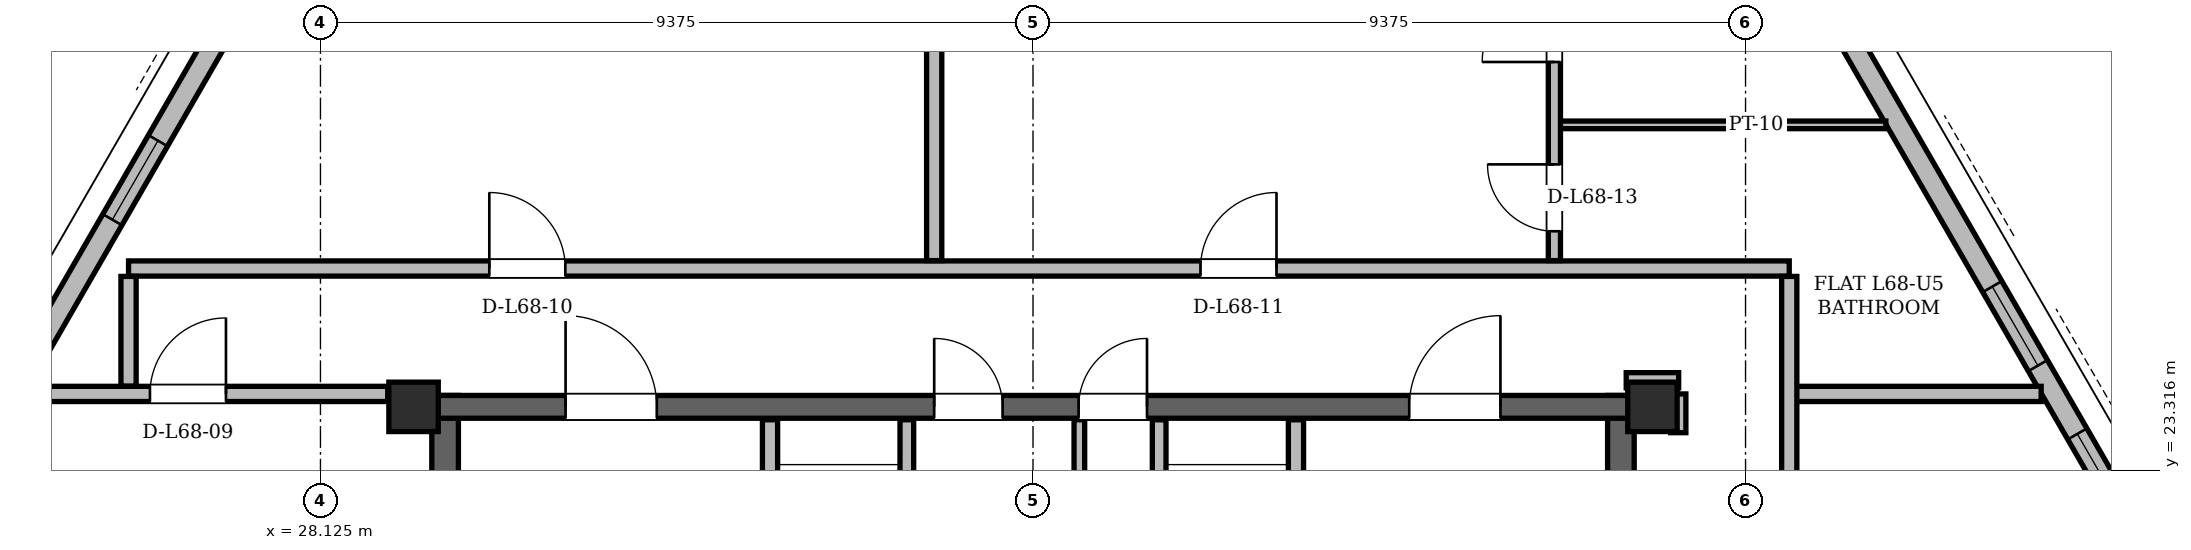
"""IFC4 building model, lengths in metres.
Left out: names, types, materials, properties, quantities, classifications, styles, units other than length and angle.
Written with IfcOpenShell. Run it as: python <this file> out.ifc"""

import sys

from ifc_helpers import new_model, si_unit, direction, frame, frame_2d, origin, origin_2d, place, context, subcontext, project, spatial, rectangle, hollow_rectangle, extrude, element, fill, save


model = new_model("IFC4")
c1 = context("Model", 3, precision=1e-05, world=origin(), true_north=direction((0.0, 1.0)))
c2 = subcontext(c1, "Body", "Model", "MODEL_VIEW")
j1 = project(units=[si_unit("LENGTHUNIT", "METRE"), si_unit("PLANEANGLEUNIT", "RADIAN")], contexts=[c1])
p1 = place(None, origin())
s1 = spatial("IfcSite", under=j1, at=p1, CompositionType="ELEMENT")
p2 = place(p1, origin())
s2 = spatial("IfcBuilding", under=s1, at=p2, CompositionType="ELEMENT")
p3 = place(p2, frame((0.0, 0.0, 257.7)))
s3 = spatial("IfcBuildingStorey", under=s2, at=p3, CompositionType="ELEMENT", Elevation=257.7)
for number, where, z_axis, x_axis in (
    (1, (45.65, 24.15, 0.0), (0.0, 0.0, 1.0), (1.0, 0.0, 0.0)),
    (2, (29.35, 24.15, 0.0), (0.0, 0.0, 1.0), (1.0, 0.0, 0.0)),
):
    element("IfcColumn", number, at=place(p3, frame(where, z_axis=z_axis, x_axis=x_axis)), inside=s3, PredefinedType="COLUMN", context=c2, shape_type="SweptSolid", body=[
        extrude(hollow_rectangle(XDim=0.65, YDim=0.65, WallThickness=0.05, at=origin_2d()), origin(), (0.0, 0.0, 1.0), 3.9),
    ])
for number, where, z_axis, x_axis in (
    (3, (29.765, 11.0, 0.0), (0.0, 0.0, 1.0), (0.0, 1.0, 0.0)),
    (4, (45.235, 11.0, 0.0), (0.0, 0.0, 1.0), (0.0, 1.0, 0.0)),
):
    element("IfcWall", number, at=place(p3, frame(where, z_axis=z_axis, x_axis=x_axis)), inside=s3, PredefinedType="SHEAR", context=c2, shape_type="SweptSolid", body=[
        extrude(rectangle(XDim=13.3, YDim=0.35, at=frame_2d((6.65, 0.0))), origin(), (0.0, 0.0, 1.0), 3.68),
    ])
p4 = place(p3, frame((29.65, 24.15, 0.0), z_axis=(0.0, 0.0, 1.0), x_axis=(1.0, 0.0, 0.0)))
e5 = element("IfcWall", 5, at=p4, inside=s3, PredefinedType="SHEAR", context=c2, shape_type="SweptSolid", body=[
    extrude(rectangle(XDim=15.7, YDim=0.3, at=frame_2d((7.85, 0.0))), origin(), (0.0, 0.0, 1.0), 3.68),
])
p5 = place(p4, frame((1.7, 0.0, 0.0)))
e6 = element("IfcOpeningElement", 6, at=p5, cuts=e5, PredefinedType="OPENING", context=c2, shape_type="SweptSolid", body=[
    extrude(rectangle(XDim=1.2, YDim=2.2, at=frame_2d((0.6, 1.1))), frame((0.0, 0.15, 0.0), z_axis=(0.0, -1.0, 0.0), x_axis=(1.0, 0.0, 0.0)), (0.0, 0.0, 1.0), 0.3),
])
p6 = place(p4, frame((12.8, 0.0, 0.0)))
e7 = element("IfcOpeningElement", 7, at=p6, cuts=e5, PredefinedType="OPENING", context=c2, shape_type="SweptSolid", body=[
    extrude(rectangle(XDim=1.2, YDim=2.2, at=frame_2d((0.6, 1.1))), frame((0.0, 0.15, 0.0), z_axis=(0.0, -1.0, 0.0), x_axis=(1.0, 0.0, 0.0)), (0.0, 0.0, 1.0), 0.3),
])
p7 = place(p4, frame((6.55, 0.0, 0.0)))
e8 = element("IfcOpeningElement", 8, at=p7, cuts=e5, PredefinedType="OPENING", context=c2, shape_type="SweptSolid", body=[
    extrude(rectangle(XDim=0.9, YDim=2.05, at=frame_2d((0.45, 1.025))), frame((0.0, 0.15, 0.0), z_axis=(0.0, -1.0, 0.0), x_axis=(1.0, 0.0, 0.0)), (0.0, 0.0, 1.0), 0.3),
])
p8 = place(p4, frame((8.45, 0.0, 0.0)))
e9 = element("IfcOpeningElement", 9, at=p8, cuts=e5, PredefinedType="OPENING", context=c2, shape_type="SweptSolid", body=[
    extrude(rectangle(XDim=0.9, YDim=2.05, at=frame_2d((0.45, 1.025))), frame((0.0, 0.15, 0.0), z_axis=(0.0, -1.0, 0.0), x_axis=(1.0, 0.0, 0.0)), (0.0, 0.0, 1.0), 0.3),
])
p9 = place(p3, frame((58.693, 10.886, 0.0), z_axis=(0.0, 0.0, 1.0), x_axis=(-0.500001564453, 0.866024500545, 0.0)))
e10 = element("IfcWall", 10, at=p9, inside=s3, PredefinedType="SOLIDWALL", context=c2, shape_type="SweptSolid", body=[
    extrude(rectangle(XDim=37.152, YDim=0.29, at=frame_2d((18.576, 0.0))), origin(), (0.0, 0.0, 1.0), 3.058),
])
p10 = place(p9, frame((6.789, 0.0, 0.0)))
e11 = element("IfcOpeningElement", 11, at=p10, cuts=e10, PredefinedType="OPENING", context=c2, shape_type="SweptSolid", body=[
    extrude(rectangle(XDim=1.5, YDim=2.2, at=frame_2d((0.75, 1.1))), frame((0.0, 0.145, 0.0), z_axis=(0.0, -1.0, 0.0), x_axis=(1.0, 0.0, 0.0)), (0.0, 0.0, 1.0), 0.29),
])
p11 = place(p9, frame((28.247, 0.0, 0.0)))
e12 = element("IfcOpeningElement", 12, at=p11, cuts=e10, PredefinedType="OPENING", context=c2, shape_type="SweptSolid", body=[
    extrude(rectangle(XDim=1.5, YDim=2.2, at=frame_2d((0.75, 1.1))), frame((0.0, 0.145, 0.0), z_axis=(0.0, -1.0, 0.0), x_axis=(1.0, 0.0, 0.0)), (0.0, 0.0, 1.0), 0.29),
])
p12 = place(p9, frame((12.305, 0.0, 0.85)))
e13 = element("IfcOpeningElement", 13, at=p12, cuts=e10, PredefinedType="OPENING", context=c2, shape_type="SweptSolid", body=[
    extrude(rectangle(XDim=2.6, YDim=1.95, at=frame_2d((1.3, 0.975))), frame((0.0, 0.145, 0.0), z_axis=(0.0, -1.0, 0.0), x_axis=(1.0, 0.0, 0.0)), (0.0, 0.0, 1.0), 0.29),
])
p13 = place(p9, frame((1.096, 0.0, 0.85)))
e14 = element("IfcOpeningElement", 14, at=p13, cuts=e10, PredefinedType="OPENING", context=c2, shape_type="SweptSolid", body=[
    extrude(rectangle(XDim=2.4, YDim=1.9, at=frame_2d((1.2, 0.95))), frame((0.0, 0.145, 0.0), z_axis=(0.0, -1.0, 0.0), x_axis=(1.0, 0.0, 0.0)), (0.0, 0.0, 1.0), 0.29),
])
p14 = place(p9, frame((33.401, 0.0, 0.85)))
e15 = element("IfcOpeningElement", 15, at=p14, cuts=e10, PredefinedType="OPENING", context=c2, shape_type="SweptSolid", body=[
    extrude(rectangle(XDim=1.2, YDim=1.48, at=frame_2d((0.6, 0.74))), frame((0.0, 0.145, 0.0), z_axis=(0.0, -1.0, 0.0), x_axis=(1.0, 0.0, 0.0)), (0.0, 0.0, 1.0), 0.29),
])
p15 = place(p9, frame((15.942, 0.0, 0.85)))
e16 = element("IfcOpeningElement", 16, at=p15, cuts=e10, PredefinedType="OPENING", context=c2, shape_type="SweptSolid", body=[
    extrude(rectangle(XDim=1.2, YDim=1.48, at=frame_2d((0.6, 0.74))), frame((0.0, 0.145, 0.0), z_axis=(0.0, -1.0, 0.0), x_axis=(1.0, 0.0, 0.0)), (0.0, 0.0, 1.0), 0.29),
])
p16 = place(p9, frame((23.43, 0.0, 0.85)))
e17 = element("IfcOpeningElement", 17, at=p16, cuts=e10, PredefinedType="OPENING", context=c2, shape_type="SweptSolid", body=[
    extrude(rectangle(XDim=1.2, YDim=1.48, at=frame_2d((0.6, 0.74))), frame((0.0, 0.145, 0.0), z_axis=(0.0, -1.0, 0.0), x_axis=(1.0, 0.0, 0.0)), (0.0, 0.0, 1.0), 0.29),
])
p17 = place(p3, frame((34.883, 43.06, 0.0), z_axis=(0.0, 0.0, 1.0), x_axis=(-0.500001564453, -0.866024500545, 0.0)))
e18 = element("IfcWall", 18, at=p17, inside=s3, PredefinedType="SOLIDWALL", context=c2, shape_type="SweptSolid", body=[
    extrude(rectangle(XDim=37.152, YDim=0.29, at=frame_2d((18.576, 0.0))), origin(), (0.0, 0.0, 1.0), 3.058),
])
p18 = place(p17, frame((3.639, 0.0, 0.0)))
e19 = element("IfcOpeningElement", 19, at=p18, cuts=e18, PredefinedType="OPENING", context=c2, shape_type="SweptSolid", body=[
    extrude(rectangle(XDim=1.5, YDim=2.2, at=frame_2d((0.75, 1.1))), frame((0.0, 0.145, 0.0), z_axis=(0.0, -1.0, 0.0), x_axis=(1.0, 0.0, 0.0)), (0.0, 0.0, 1.0), 0.29),
])
p19 = place(p17, frame((27.617, 0.0, 0.0)))
e20 = element("IfcOpeningElement", 20, at=p19, cuts=e18, PredefinedType="OPENING", context=c2, shape_type="SweptSolid", body=[
    extrude(rectangle(XDim=1.5, YDim=2.2, at=frame_2d((0.75, 1.1))), frame((0.0, 0.145, 0.0), z_axis=(0.0, -1.0, 0.0), x_axis=(1.0, 0.0, 0.0)), (0.0, 0.0, 1.0), 0.29),
])
p20 = place(p17, frame((22.781, 0.0, 0.85)))
e21 = element("IfcOpeningElement", 21, at=p20, cuts=e18, PredefinedType="OPENING", context=c2, shape_type="SweptSolid", body=[
    extrude(rectangle(XDim=1.6, YDim=1.7, at=frame_2d((0.8, 0.85))), frame((0.0, 0.145, 0.0), z_axis=(0.0, -1.0, 0.0), x_axis=(1.0, 0.0, 0.0)), (0.0, 0.0, 1.0), 0.29),
])
p21 = place(p17, frame((34.44, 0.0, 0.85)))
e22 = element("IfcOpeningElement", 22, at=p21, cuts=e18, PredefinedType="OPENING", context=c2, shape_type="SweptSolid", body=[
    extrude(rectangle(XDim=1.4, YDim=1.6, at=frame_2d((0.7, 0.8))), frame((0.0, 0.145, 0.0), z_axis=(0.0, -1.0, 0.0), x_axis=(1.0, 0.0, 0.0)), (0.0, 0.0, 1.0), 0.29),
])
p22 = place(p17, frame((8.125, 0.0, 0.85)))
e23 = element("IfcOpeningElement", 23, at=p22, cuts=e18, PredefinedType="OPENING", context=c2, shape_type="SweptSolid", body=[
    extrude(rectangle(XDim=1.8, YDim=1.75, at=frame_2d((0.9, 0.875))), frame((0.0, 0.145, 0.0), z_axis=(0.0, -1.0, 0.0), x_axis=(1.0, 0.0, 0.0)), (0.0, 0.0, 1.0), 0.29),
])
p23 = place(p17, frame((17.792, 0.0, 0.85)))
e24 = element("IfcOpeningElement", 24, at=p23, cuts=e18, PredefinedType="OPENING", context=c2, shape_type="SweptSolid", body=[
    extrude(rectangle(XDim=1.2, YDim=1.48, at=frame_2d((0.6, 0.74))), frame((0.0, 0.145, 0.0), z_axis=(0.0, -1.0, 0.0), x_axis=(1.0, 0.0, 0.0)), (0.0, 0.0, 1.0), 0.29),
])
p24 = place(p17, frame((1.292, 0.0, 0.85)))
e25 = element("IfcOpeningElement", 25, at=p24, cuts=e18, PredefinedType="OPENING", context=c2, shape_type="SweptSolid", body=[
    extrude(rectangle(XDim=1.6, YDim=1.7, at=frame_2d((0.8, 0.85))), frame((0.0, 0.145, 0.0), z_axis=(0.0, -1.0, 0.0), x_axis=(1.0, 0.0, 0.0)), (0.0, 0.0, 1.0), 0.29),
])
p25 = place(p3, frame((34.04, 19.48, 0.0), z_axis=(0.0, 0.0, 1.0), x_axis=(0.0, 1.0, 0.0)))
e26 = element("IfcWall", 26, at=p25, inside=s3, PredefinedType="PARTITIONING", context=c2, shape_type="SweptSolid", body=[
    extrude(rectangle(XDim=4.5, YDim=0.2, at=frame_2d((2.25, 0.0))), origin(), (0.0, 0.0, 1.0), 3.68),
])
p26 = place(p25, frame((2.12, 0.0, 0.0)))
e27 = element("IfcOpeningElement", 27, at=p26, cuts=e26, PredefinedType="OPENING", context=c2, shape_type="SweptSolid", body=[
    extrude(rectangle(XDim=1.1, YDim=2.2, at=frame_2d((0.55, 1.1))), frame((0.0, 0.1, 0.0), z_axis=(0.0, -1.0, 0.0), x_axis=(1.0, 0.0, 0.0)), (0.0, 0.0, 1.0), 0.2),
])
p27 = place(p3, frame((35.84, 20.96, 0.0), z_axis=(0.0, 0.0, 1.0), x_axis=(0.0, 1.0, 0.0)))
e28 = element("IfcWall", 28, at=p27, inside=s3, PredefinedType="PARTITIONING", context=c2, shape_type="SweptSolid", body=[
    extrude(rectangle(XDim=3.02, YDim=0.18, at=frame_2d((1.51, 0.0))), origin(), (0.0, 0.0, 1.0), 3.68),
])
p28 = place(p3, frame((40.96, 19.48, 0.0), z_axis=(0.0, 0.0, 1.0), x_axis=(0.0, 1.0, 0.0)))
e29 = element("IfcWall", 29, at=p28, inside=s3, PredefinedType="PARTITIONING", context=c2, shape_type="SweptSolid", body=[
    extrude(rectangle(XDim=4.5, YDim=0.2, at=frame_2d((2.25, 0.0))), origin(), (0.0, 0.0, 1.0), 3.68),
])
p29 = place(p28, frame((2.12, 0.0, 0.0)))
e30 = element("IfcOpeningElement", 30, at=p29, cuts=e29, PredefinedType="OPENING", context=c2, shape_type="SweptSolid", body=[
    extrude(rectangle(XDim=1.1, YDim=2.2, at=frame_2d((0.55, 1.1))), frame((0.0, 0.1, 0.0), z_axis=(0.0, -1.0, 0.0), x_axis=(1.0, 0.0, 0.0)), (0.0, 0.0, 1.0), 0.2),
])
p30 = place(p3, frame((39.16, 20.96, 0.0), z_axis=(0.0, 0.0, 1.0), x_axis=(0.0, 1.0, 0.0)))
e31 = element("IfcWall", 31, at=p30, inside=s3, PredefinedType="PARTITIONING", context=c2, shape_type="SweptSolid", body=[
    extrude(rectangle(XDim=3.02, YDim=0.18, at=frame_2d((1.51, 0.0))), origin(), (0.0, 0.0, 1.0), 3.68),
])
p31 = place(p3, frame((38.11, 21.06, 0.0), z_axis=(0.0, 0.0, 1.0), x_axis=(0.0, 1.0, 0.0)))
e32 = element("IfcWall", 32, at=p31, inside=s3, PredefinedType="PARTITIONING", context=c2, shape_type="SweptSolid", body=[
    extrude(rectangle(XDim=2.92, YDim=0.14, at=frame_2d((1.46, 0.0))), origin(), (0.0, 0.0, 1.0), 3.68),
])
p32 = place(p3, frame((24.236, 24.32, 0.0), z_axis=(0.0, 0.0, 1.0), x_axis=(1.0, 0.0, 0.0)))
e33 = element("IfcWall", 33, at=p32, inside=s3, PredefinedType="PARTITIONING", context=c2, shape_type="SweptSolid", body=[
    extrude(rectangle(XDim=4.774, YDim=0.2, at=frame_2d((2.387, 0.0))), origin(), (0.0, 0.0, 1.0), 3.68),
])
p33 = place(p32, frame((1.646, 0.0, 0.0)))
e34 = element("IfcOpeningElement", 34, at=p33, cuts=e33, PredefinedType="OPENING", context=c2, shape_type="SweptSolid", body=[
    extrude(rectangle(XDim=1.0, YDim=2.18, at=frame_2d((0.5, 1.09))), frame((0.0, 0.1, 0.0), z_axis=(0.0, -1.0, 0.0), x_axis=(1.0, 0.0, 0.0)), (0.0, 0.0, 1.0), 0.2),
])
p34 = place(p3, frame((47.45, 24.32, 0.0), z_axis=(0.0, 0.0, 1.0), x_axis=(1.0, 0.0, 0.0)))
e35 = element("IfcWall", 35, at=p34, inside=s3, PredefinedType="PARTITIONING", context=c2, shape_type="SweptSolid", body=[
    extrude(rectangle(XDim=3.314, YDim=0.2, at=frame_2d((1.657, 0.0))), origin(), (0.0, 0.0, 1.0), 3.68),
])
p35 = place(p3, frame((45.305, 24.5, 0.0), z_axis=(0.0, 0.0, 1.0), x_axis=(1.0, 0.0, 0.0)))
e36 = element("IfcWall", 36, at=p35, inside=s3, PredefinedType="PARTITIONING", context=c2, shape_type="SweptSolid", body=[
    extrude(rectangle(XDim=0.69, YDim=0.2, at=frame_2d((0.345, 0.0))), origin(), (0.0, 0.0, 1.0), 3.266),
])
p36 = place(p3, frame((25.6, 25.97, 0.0), z_axis=(0.0, 0.0, 1.0), x_axis=(1.0, 0.0, 0.0)))
e37 = element("IfcWall", 37, at=p36, inside=s3, PredefinedType="PARTITIONING", context=c2, shape_type="SweptSolid", body=[
    extrude(rectangle(XDim=21.85, YDim=0.2, at=frame_2d((10.925, 0.0))), origin(), (0.0, 0.0, 1.0), 3.266),
])
p37 = place(p36, frame((4.747, 0.0, 0.0)))
e38 = element("IfcOpeningElement", 38, at=p37, cuts=e37, PredefinedType="OPENING", context=c2, shape_type="SweptSolid", body=[
    extrude(rectangle(XDim=1.0, YDim=2.18, at=frame_2d((0.5, 1.09))), frame((0.0, 0.1, 0.0), z_axis=(0.0, -1.0, 0.0), x_axis=(1.0, 0.0, 0.0)), (0.0, 0.0, 1.0), 0.2),
])
p38 = place(p36, frame((14.104, 0.0, 0.0)))
e39 = element("IfcOpeningElement", 39, at=p38, cuts=e37, PredefinedType="OPENING", context=c2, shape_type="SweptSolid", body=[
    extrude(rectangle(XDim=1.0, YDim=2.18, at=frame_2d((0.5, 1.09))), frame((0.0, 0.1, 0.0), z_axis=(0.0, -1.0, 0.0), x_axis=(1.0, 0.0, 0.0)), (0.0, 0.0, 1.0), 0.2),
])
p39 = place(p3, frame((44.355, 27.86, 0.0), z_axis=(0.0, 0.0, 1.0), x_axis=(1.0, 0.0, 0.0)))
e40 = element("IfcWall", 40, at=p39, inside=s3, PredefinedType="PARTITIONING", context=c2, shape_type="SweptSolid", body=[
    extrude(rectangle(XDim=4.365, YDim=0.1, at=frame_2d((2.183, 0.0))), origin(), (0.0, 0.0, 1.0), 3.68),
])
p40 = place(p3, frame((25.6, 24.424, 0.0), z_axis=(0.0, 0.0, 1.0), x_axis=(0.0, 1.0, 0.0)))
e41 = element("IfcWall", 41, at=p40, inside=s3, PredefinedType="PARTITIONING", context=c2, shape_type="SweptSolid", body=[
    extrude(rectangle(XDim=1.442, YDim=0.2, at=frame_2d((0.721, 0.0))), origin(), (0.0, 0.0, 1.0), 3.68),
])
p41 = place(p3, frame((36.2, 26.074, 0.0), z_axis=(0.0, 0.0, 1.0), x_axis=(0.0, 1.0, 0.0)))
e42 = element("IfcWall", 42, at=p41, inside=s3, PredefinedType="PARTITIONING", context=c2, shape_type="SweptSolid", body=[
    extrude(rectangle(XDim=16.837, YDim=0.2, at=frame_2d((8.419, 0.0))), origin(), (0.0, 0.0, 1.0), 3.68),
])
p42 = place(p3, frame((44.36, 26.074, 0.0), z_axis=(0.0, 0.0, 1.0), x_axis=(0.0, 1.0, 0.0)))
e43 = element("IfcWall", 43, at=p42, inside=s3, PredefinedType="PARTITIONING", context=c2, shape_type="SweptSolid", body=[
    extrude(rectangle(XDim=9.339, YDim=0.16, at=frame_2d((4.669, 0.0))), origin(), (0.0, 0.0, 1.0), 3.058),
])
p43 = place(p42, frame((0.386, 0.0, 0.0)))
e44 = element("IfcOpeningElement", 44, at=p43, cuts=e43, PredefinedType="OPENING", context=c2, shape_type="SweptSolid", body=[
    extrude(rectangle(XDim=0.88, YDim=2.08, at=frame_2d((0.44, 1.04))), frame((0.0, 0.08, 0.0), z_axis=(0.0, -1.0, 0.0), x_axis=(1.0, 0.0, 0.0)), (0.0, 0.0, 1.0), 0.16),
])
p44 = place(p42, frame((2.613, 0.0, 0.0)))
e45 = element("IfcOpeningElement", 45, at=p44, cuts=e43, PredefinedType="OPENING", context=c2, shape_type="SweptSolid", body=[
    extrude(rectangle(XDim=0.95, YDim=2.1, at=frame_2d((0.475, 1.05))), frame((0.0, 0.08, 0.0), z_axis=(0.0, -1.0, 0.0), x_axis=(1.0, 0.0, 0.0)), (0.0, 0.0, 1.0), 0.16),
])
p45 = place(p42, frame((5.471, 0.0, 0.0)))
e46 = element("IfcOpeningElement", 46, at=p45, cuts=e43, PredefinedType="OPENING", context=c2, shape_type="SweptSolid", body=[
    extrude(rectangle(XDim=0.95, YDim=2.1, at=frame_2d((0.475, 1.05))), frame((0.0, 0.08, 0.0), z_axis=(0.0, -1.0, 0.0), x_axis=(1.0, 0.0, 0.0)), (0.0, 0.0, 1.0), 0.16),
])
p46 = place(p3, frame((45.99, 23.81, 0.0), z_axis=(0.0, 0.0, 1.0), x_axis=(0.0, 1.0, 0.0)))
e47 = element("IfcWall", 47, at=p46, inside=s3, PredefinedType="PARTITIONING", context=c2, shape_type="SweptSolid", body=[
    extrude(rectangle(XDim=0.51, YDim=0.2, at=frame_2d((0.255, 0.0))), origin(), (0.0, 0.0, 1.0), 3.68),
])
p47 = place(p3, frame((47.45, 9.404, 0.0), z_axis=(0.0, 0.0, 1.0), x_axis=(0.0, 1.0, 0.0)))
e48 = element("IfcWall", 48, at=p47, inside=s3, PredefinedType="PARTITIONING", context=c2, shape_type="SweptSolid", body=[
    extrude(rectangle(XDim=16.462, YDim=0.2, at=frame_2d((8.231, 0.0))), origin(), (0.0, 0.0, 1.0), 3.266),
])
p48 = place(p47, frame((9.32, 0.0, 0.0)))
e49 = element("IfcOpeningElement", 49, at=p48, cuts=e48, PredefinedType="OPENING", context=c2, shape_type="SweptSolid", body=[
    extrude(rectangle(XDim=1.0, YDim=2.18, at=frame_2d((0.5, 1.09))), frame((0.0, 0.1, 0.0), z_axis=(0.0, -1.0, 0.0), x_axis=(1.0, 0.0, 0.0)), (0.0, 0.0, 1.0), 0.2),
])
p49 = place(p12, origin())
e50 = element("IfcWindow", 50, at=p49, inside=s3, PartitioningType="SINGLE_PANEL", PredefinedType="WINDOW", context=c2, shape_type="SweptSolid", body=[
    extrude(rectangle(XDim=2.6, YDim=1.95, at=frame_2d((1.3, 0.975))), frame((0.0, 0.03, 0.0), z_axis=(0.0, -1.0, 0.0), x_axis=(1.0, 0.0, 0.0)), (0.0, 0.0, 1.0), 0.06),
])
fill(e13, e50)
p50 = place(p15, origin())
e51 = element("IfcWindow", 51, at=p50, inside=s3, PartitioningType="SINGLE_PANEL", PredefinedType="WINDOW", context=c2, shape_type="SweptSolid", body=[
    extrude(rectangle(XDim=1.2, YDim=1.48, at=frame_2d((0.6, 0.74))), frame((0.0, 0.03, 0.0), z_axis=(0.0, -1.0, 0.0), x_axis=(1.0, 0.0, 0.0)), (0.0, 0.0, 1.0), 0.06),
])
fill(e16, e51)
p51 = place(p23, origin())
e52 = element("IfcWindow", 52, at=p51, inside=s3, PartitioningType="SINGLE_PANEL", PredefinedType="WINDOW", context=c2, shape_type="SweptSolid", body=[
    extrude(rectangle(XDim=1.2, YDim=1.48, at=frame_2d((0.6, 0.74))), frame((0.0, 0.03, 0.0), z_axis=(0.0, -1.0, 0.0), x_axis=(1.0, 0.0, 0.0)), (0.0, 0.0, 1.0), 0.06),
])
fill(e24, e52)
p52 = place(p5, origin())
e53 = element("IfcDoor", 53, at=p52, inside=s3, OperationType="SINGLE_SWING_LEFT", PredefinedType="DOOR", context=c2, shape_type="SweptSolid", body=[
    extrude(rectangle(XDim=1.2, YDim=2.2, at=frame_2d((0.6, 1.1))), frame((0.0, 0.025, 0.0), z_axis=(0.0, -1.0, 0.0), x_axis=(1.0, 0.0, 0.0)), (0.0, 0.0, 1.0), 0.05),
])
fill(e6, e53)
p53 = place(p6, origin())
e54 = element("IfcDoor", 54, at=p53, inside=s3, OperationType="SINGLE_SWING_RIGHT", PredefinedType="DOOR", context=c2, shape_type="SweptSolid", body=[
    extrude(rectangle(XDim=1.2, YDim=2.2, at=frame_2d((0.6, 1.1))), frame((0.0, 0.025, 0.0), z_axis=(0.0, -1.0, 0.0), x_axis=(1.0, 0.0, 0.0)), (0.0, 0.0, 1.0), 0.05),
])
fill(e7, e54)
p54 = place(p7, origin())
e55 = element("IfcDoor", 55, at=p54, inside=s3, OperationType="SINGLE_SWING_LEFT", PredefinedType="DOOR", context=c2, shape_type="SweptSolid", body=[
    extrude(rectangle(XDim=0.9, YDim=2.05, at=frame_2d((0.45, 1.025))), frame((0.0, 0.025, 0.0), z_axis=(0.0, -1.0, 0.0), x_axis=(1.0, 0.0, 0.0)), (0.0, 0.0, 1.0), 0.05),
])
fill(e8, e55)
p55 = place(p8, origin())
e56 = element("IfcDoor", 56, at=p55, inside=s3, OperationType="SINGLE_SWING_RIGHT", PredefinedType="DOOR", context=c2, shape_type="SweptSolid", body=[
    extrude(rectangle(XDim=0.9, YDim=2.05, at=frame_2d((0.45, 1.025))), frame((0.0, 0.025, 0.0), z_axis=(0.0, -1.0, 0.0), x_axis=(1.0, 0.0, 0.0)), (0.0, 0.0, 1.0), 0.05),
])
fill(e9, e56)
p56 = place(p33, origin())
e57 = element("IfcDoor", 57, at=p56, inside=s3, OperationType="SINGLE_SWING_RIGHT", PredefinedType="DOOR", context=c2, shape_type="SweptSolid", body=[
    extrude(rectangle(XDim=1.0, YDim=2.18, at=frame_2d((0.5, 1.09))), frame((0.0, 0.025, 0.0), z_axis=(0.0, -1.0, 0.0), x_axis=(1.0, 0.0, 0.0)), (0.0, 0.0, 1.0), 0.05),
])
fill(e34, e57)
p57 = place(p37, origin())
e58 = element("IfcDoor", 58, at=p57, inside=s3, OperationType="SINGLE_SWING_LEFT", PredefinedType="DOOR", context=c2, shape_type="SweptSolid", body=[
    extrude(rectangle(XDim=1.0, YDim=2.18, at=frame_2d((0.5, 1.09))), frame((0.0, 0.025, 0.0), z_axis=(0.0, -1.0, 0.0), x_axis=(1.0, 0.0, 0.0)), (0.0, 0.0, 1.0), 0.05),
])
fill(e38, e58)
p58 = place(p38, origin())
e59 = element("IfcDoor", 59, at=p58, inside=s3, OperationType="SINGLE_SWING_RIGHT", PredefinedType="DOOR", context=c2, shape_type="SweptSolid", body=[
    extrude(rectangle(XDim=1.0, YDim=2.18, at=frame_2d((0.5, 1.09))), frame((0.0, 0.025, 0.0), z_axis=(0.0, -1.0, 0.0), x_axis=(1.0, 0.0, 0.0)), (0.0, 0.0, 1.0), 0.05),
])
fill(e39, e59)
p59 = place(p43, origin())
e60 = element("IfcDoor", 60, at=p59, inside=s3, OperationType="SINGLE_SWING_RIGHT", PredefinedType="DOOR", context=c2, shape_type="SweptSolid", body=[
    extrude(rectangle(XDim=0.88, YDim=2.08, at=frame_2d((0.44, 1.04))), frame((0.0, 0.025, 0.0), z_axis=(0.0, -1.0, 0.0), x_axis=(1.0, 0.0, 0.0)), (0.0, 0.0, 1.0), 0.05),
])
fill(e44, e60)
p60 = place(p44, origin())
e61 = element("IfcDoor", 61, at=p60, inside=s3, OperationType="SINGLE_SWING_LEFT", PredefinedType="DOOR", context=c2, shape_type="SweptSolid", body=[
    extrude(rectangle(XDim=0.95, YDim=2.1, at=frame_2d((0.475, 1.05))), frame((0.0, 0.025, 0.0), z_axis=(0.0, -1.0, 0.0), x_axis=(1.0, 0.0, 0.0)), (0.0, 0.0, 1.0), 0.05),
])
fill(e45, e61)
save(model, sys.argv[1])
